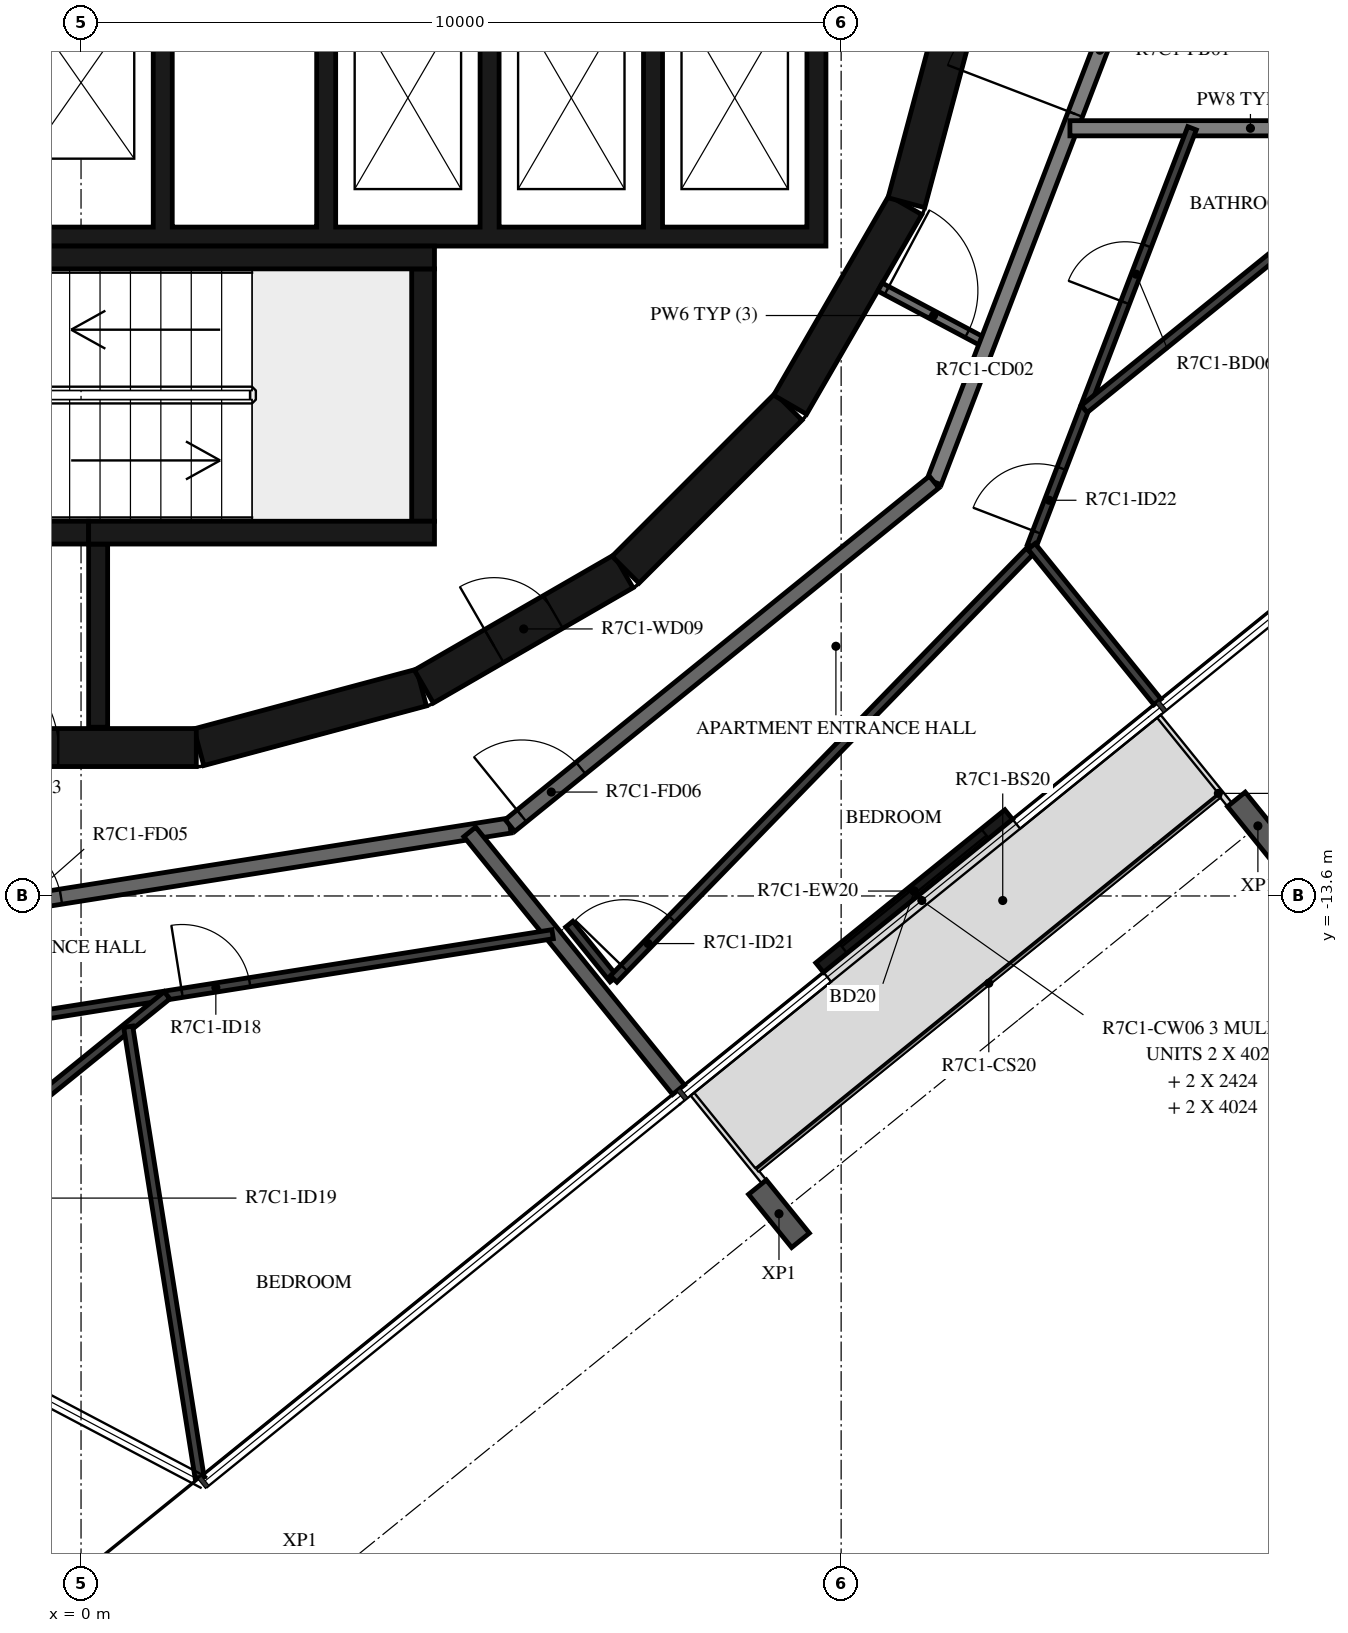
"""IFC4 building model, lengths in metres.
Left out: names, types, materials, properties, quantities, classifications, styles, units other than length and angle.
Written with IfcOpenShell. Run it as: python <this file> out.ifc"""

import sys

from ifc_helpers import new_model, si_unit, direction, frame, frame_2d, origin, origin_2d, place, context, subcontext, project, spatial, polyline, rectangle, i_section, outline, extrude, element, fill, save


model = new_model("IFC4")
c1 = context("Model", 3, precision=1e-05, world=origin(), true_north=direction((0.0, 1.0)))
c2 = subcontext(c1, "Body", "Model", "MODEL_VIEW")
j1 = project(units=[si_unit("LENGTHUNIT", "METRE"), si_unit("PLANEANGLEUNIT", "RADIAN")], contexts=[c1])
p1 = place(None, origin())
s1 = spatial("IfcSite", under=j1, at=p1, CompositionType="ELEMENT")
p2 = place(p1, origin())
s2 = spatial("IfcBuilding", under=s1, at=p2, CompositionType="ELEMENT")
p3 = place(p2, frame((0.0, 0.0, 287.9)))
s3 = spatial("IfcBuildingStorey", under=s2, at=p3, CompositionType="ELEMENT", Elevation=287.9)
for number, where, z_axis, x_axis in (
    (1, (15.483, -12.678, -0.38), (0.0, 0.0, 1.0), (-0.777, -0.629, 0.0)),
    (2, (9.182, -17.781, -0.38), (0.0, 0.0, 1.0), (-0.777, -0.629, 0.0)),
):
    element("IfcColumn", number, at=place(p3, frame(where, z_axis=z_axis, x_axis=x_axis)), inside=s3, PredefinedType="COLUMN", context=c2, shape_type="SweptSolid", body=[
        extrude(i_section(OverallWidth=0.3, OverallDepth=0.9, WebThickness=0.019, FlangeThickness=0.035, FilletRadius=0.03, at=origin_2d()), origin(), (0.0, 0.0, 1.0), 2.616),
    ])
p4 = place(p3, frame((9.717, -14.542, 0.0), z_axis=(0.0, 0.0, 1.0), x_axis=(0.777125818, 0.629345265333, 0.0)))
e3 = element("IfcWall", 3, at=p4, inside=s3, PredefinedType="STANDARD", context=c2, shape_type="SweptSolid", body=[
    extrude(rectangle(XDim=3.2, YDim=0.16, at=frame_2d((1.6, 0.0))), origin(), (0.0, 0.0, 1.0), 3.05),
])
p5 = place(p4, frame((0.4, 0.0, 0.0)))
e4 = element("IfcOpeningElement", 4, at=p5, cuts=e3, PredefinedType="OPENING", context=c2, shape_type="SweptSolid", body=[
    extrude(rectangle(XDim=2.4, YDim=2.4, at=frame_2d((1.2, 1.2))), frame((0.0, 0.09, 0.0), z_axis=(0.0, -1.0, 0.0), x_axis=(1.0, 0.0, 0.0)), (0.0, 0.0, 1.0), 0.18),
])
p6 = place(p3, frame((1.55, -11.643, 0.0), z_axis=(0.0, 0.0, 1.0), x_axis=(0.965948410781, 0.258734743916, 0.0)))
e5 = element("IfcWall", 5, at=p6, inside=s3, PredefinedType="SHEAR", context=c2, shape_type="SweptSolid", body=[
    extrude(rectangle(XDim=3.033, YDim=0.5, at=frame_2d((1.516, 0.0))), origin(), (0.0, 0.0, 1.0), 3.05),
])
p7 = place(p3, frame((4.51, -10.845, 0.0), z_axis=(0.0, 0.0, 1.0), x_axis=(0.865975092491, 0.500087131594, 0.0)))
e6 = element("IfcWall", 6, at=p7, inside=s3, PredefinedType="SHEAR", context=c2, shape_type="SweptSolid", body=[
    extrude(rectangle(XDim=3.033, YDim=0.5, at=frame_2d((1.516, 0.0))), origin(), (0.0, 0.0, 1.0), 3.05),
])
p8 = place(p7, frame((1.066, 0.0, 0.0)))
e7 = element("IfcOpeningElement", 7, at=p8, cuts=e6, PredefinedType="OPENING", context=c2, shape_type="SweptSolid", body=[
    extrude(rectangle(XDim=0.9, YDim=2.1, at=frame_2d((0.45, 1.05))), frame((0.0, 0.26, 0.0), z_axis=(0.0, -1.0, 0.0), x_axis=(1.0, 0.0, 0.0)), (0.0, 0.0, 1.0), 0.52),
])
p9 = place(p3, frame((7.164, -9.308, 0.0), z_axis=(0.0, 0.0, 1.0), x_axis=(0.707106781187, 0.707106781187, 0.0)))
e8 = element("IfcWall", 8, at=p9, inside=s3, PredefinedType="SHEAR", context=c2, shape_type="SweptSolid", body=[
    extrude(rectangle(XDim=3.032, YDim=0.5, at=frame_2d((1.516, 0.0))), origin(), (0.0, 0.0, 1.0), 3.05),
])
for number, where, z_axis, x_axis in (
    (9, (9.329, -7.137, 0.0), (0.0, 0.0, 1.0), (0.5, 0.866, 0.0)),
    (10, (10.858, -4.479, 0.0), (0.0, 0.0, 1.0), (0.259, 0.966, 0.0)),
):
    element("IfcWall", number, at=place(p3, frame(where, z_axis=z_axis, x_axis=x_axis)), inside=s3, PredefinedType="SHEAR", context=c2, shape_type="SweptSolid", body=[
        extrude(rectangle(XDim=3.033, YDim=0.5, at=frame_2d((1.516, 0.0))), origin(), (0.0, 0.0, 1.0), 3.05),
    ])
p10 = place(p3, frame((-1.516, -11.647, 0.0), z_axis=(0.0, 0.0, 1.0), x_axis=(1.0, 0.0, 0.0)))
e11 = element("IfcWall", 11, at=p10, inside=s3, PredefinedType="SHEAR", context=c2, shape_type="SweptSolid", body=[
    extrude(rectangle(XDim=3.033, YDim=0.5, at=frame_2d((1.516, 0.0))), origin(), (0.0, 0.0, 1.0), 3.05),
])
p11 = place(p10, frame((0.016, 0.0, 0.0)))
e12 = element("IfcOpeningElement", 12, at=p11, cuts=e11, PredefinedType="OPENING", context=c2, shape_type="SweptSolid", body=[
    extrude(rectangle(XDim=1.2, YDim=2.1, at=frame_2d((0.6, 1.05))), frame((0.0, 0.26, 0.0), z_axis=(0.0, -1.0, 0.0), x_axis=(1.0, 0.0, 0.0)), (0.0, 0.0, 1.0), 0.52),
])
p12 = place(p3, frame((-2.4, -5.2, 0.0), z_axis=(0.0, 0.0, 1.0), x_axis=(1.0, 0.0, 0.0)))
e13 = element("IfcWall", 13, at=p12, inside=s3, PredefinedType="SHEAR", context=c2, shape_type="SweptSolid", body=[
    extrude(rectangle(XDim=7.05, YDim=0.3, at=frame_2d((3.525, 0.0))), origin(), (0.0, 0.0, 1.0), 3.05),
])
p13 = place(p3, frame((4.5, -8.67, 0.0), z_axis=(0.0, 0.0, 1.0), x_axis=(0.0, 1.0, 0.0)))
e14 = element("IfcWall", 14, at=p13, inside=s3, PredefinedType="SHEAR", context=c2, shape_type="SweptSolid", body=[
    extrude(rectangle(XDim=3.32, YDim=0.3, at=frame_2d((1.66, 0.0))), origin(), (0.0, 0.0, 1.0), 3.05),
])
p14 = place(p3, frame((0.1, -8.82, 0.0), z_axis=(0.0, 0.0, 1.0), x_axis=(1.0, 0.0, 0.0)))
e15 = element("IfcWall", 15, at=p14, inside=s3, PredefinedType="SHEAR", context=c2, shape_type="SweptSolid", body=[
    extrude(rectangle(XDim=4.55, YDim=0.3, at=frame_2d((2.275, 0.0))), origin(), (0.0, 0.0, 1.0), 3.05),
])
p15 = place(p3, frame((-2.4, -8.82, 0.0), z_axis=(0.0, 0.0, 1.0), x_axis=(1.0, 0.0, 0.0)))
e16 = element("IfcWall", 16, at=p15, inside=s3, PredefinedType="SHEAR", context=c2, shape_type="SweptSolid", body=[
    extrude(rectangle(XDim=2.5, YDim=0.3, at=frame_2d((1.25, 0.0))), origin(), (0.0, 0.0, 1.0), 3.05),
])
p16 = place(p15, frame((0.65, 0.0, 0.0)))
e17 = element("IfcOpeningElement", 17, at=p16, cuts=e16, PredefinedType="OPENING", context=c2, shape_type="SweptSolid", body=[
    extrude(rectangle(XDim=1.2, YDim=2.1, at=frame_2d((0.6, 1.05))), frame((0.0, 0.16, 0.0), z_axis=(0.0, -1.0, 0.0), x_axis=(1.0, 0.0, 0.0)), (0.0, 0.0, 1.0), 0.32),
])
p17 = place(p3, frame((0.225, -8.97, 0.0), z_axis=(0.0, 0.0, 1.0), x_axis=(0.0, -1.0, 0.0)))
e18 = element("IfcWall", 18, at=p17, inside=s3, PredefinedType="SHEAR", context=c2, shape_type="SweptSolid", body=[
    extrude(rectangle(XDim=2.41, YDim=0.25, at=frame_2d((1.205, 0.0))), origin(), (0.0, 0.0, 1.0), 3.05),
])
p18 = place(p3, origin())
e19 = element("IfcWall", 19, at=p18, inside=s3, PredefinedType="SHEAR", context=c2, shape_type="SweptSolid", body=[
    extrude(outline(polyline([(9.8, -5.05), (9.8, -4.8), (9.8, -1.9), (9.55, -1.9), (9.55, -4.8), (7.65, -4.8), (7.65, -1.9), (7.4, -1.9), (7.4, -4.8), (5.5, -4.8), (5.5, -1.9), (5.25, -1.9), (5.25, -4.8), (3.35, -4.8), (3.35, -1.9), (3.1, -1.9), (3.1, -4.8), (1.2, -4.8), (1.2, -1.9), (0.95, -1.9), (0.95, -4.8), (-0.95, -4.8), (-0.95, -1.9), (-1.2, -1.9), (-1.2, -4.8), (-3.1, -4.8), (-3.1, -1.9), (-3.35, -1.9), (-3.35, -4.8), (-5.25, -4.8), (-5.25, -1.9), (-5.5, -1.9), (-5.5, -4.8), (-9.55, -4.8), (-9.55, -1.9), (-9.8, -1.9), (-9.8, -4.8), (-9.8, -5.05), (9.8, -5.05)])), origin(), (0.0, 0.0, 1.0), 3.05),
])
p19 = place(p3, frame((10.511, -5.589, 0.0), z_axis=(0.0, 0.0, 1.0), x_axis=(0.882983002821, -0.469404960273, 0.0)))
e20 = element("IfcWall", 20, at=p19, inside=s3, PredefinedType="PARTITIONING", context=c2, shape_type="SweptSolid", body=[
    extrude(rectangle(XDim=1.596, YDim=0.12, at=frame_2d((0.798, 0.0))), origin(), (0.0, 0.0, 1.0), 3.05),
])
p20 = place(p19, frame((0.1, 0.0, 0.0)))
e21 = element("IfcOpeningElement", 21, at=p20, cuts=e20, PredefinedType="OPENING", context=c2, shape_type="SweptSolid", body=[
    extrude(rectangle(XDim=1.2, YDim=2.1, at=frame_2d((0.6, 1.05))), frame((0.0, 0.07, 0.0), z_axis=(0.0, -1.0, 0.0), x_axis=(1.0, 0.0, 0.0)), (0.0, 0.0, 1.0), 0.14),
])
p21 = place(p3, frame((11.223, -8.154, 0.0), z_axis=(0.0, 0.0, 1.0), x_axis=(0.358341090983, 0.93359073609, 0.0)))
e22 = element("IfcWall", 22, at=p21, inside=s3, PredefinedType="STANDARD", context=c2, shape_type="SweptSolid", body=[
    extrude(rectangle(XDim=7.181, YDim=0.2, at=frame_2d((3.59, 0.0))), origin(), (0.0, 0.0, 1.0), 3.05),
])
p22 = place(p21, frame((5.185, 0.0, 0.0)))
e23 = element("IfcOpeningElement", 23, at=p22, cuts=e22, PredefinedType="OPENING", context=c2, shape_type="SweptSolid", body=[
    extrude(rectangle(XDim=1.8, YDim=2.1, at=frame_2d((0.9, 1.05))), frame((0.0, 0.11, 0.0), z_axis=(0.0, -1.0, 0.0), x_axis=(1.0, 0.0, 0.0)), (0.0, 0.0, 1.0), 0.22),
])
p23 = place(p3, frame((-1.45, -13.797, 0.0), z_axis=(0.0, 0.0, 1.0), x_axis=(0.987690361611, 0.156421704315, 0.0)))
e24 = element("IfcWall", 24, at=p23, inside=s3, PredefinedType="STANDARD", context=c2, shape_type="SweptSolid", body=[
    extrude(rectangle(XDim=7.181, YDim=0.2, at=frame_2d((3.591, 0.0))), origin(), (0.0, 0.0, 1.0), 3.05),
])
p24 = place(p23, frame((0.2, 0.0, 0.0)))
e25 = element("IfcOpeningElement", 25, at=p24, cuts=e24, PredefinedType="OPENING", context=c2, shape_type="SweptSolid", body=[
    extrude(rectangle(XDim=1.0, YDim=2.1, at=frame_2d((0.5, 1.05))), frame((0.0, 0.11, 0.0), z_axis=(0.0, -1.0, 0.0), x_axis=(1.0, 0.0, 0.0)), (0.0, 0.0, 1.0), 0.22),
])
p25 = place(p3, frame((5.643, -12.673, 0.0), z_axis=(0.0, 0.0, 1.0), x_axis=(0.777160148113, 0.629302871585, 0.0)))
e26 = element("IfcWall", 26, at=p25, inside=s3, PredefinedType="STANDARD", context=c2, shape_type="SweptSolid", body=[
    extrude(rectangle(XDim=7.181, YDim=0.2, at=frame_2d((3.59, 0.0))), origin(), (0.0, 0.0, 1.0), 3.05),
])
p26 = place(p25, frame((0.2, 0.0, 0.0)))
e27 = element("IfcOpeningElement", 27, at=p26, cuts=e26, PredefinedType="OPENING", context=c2, shape_type="SweptSolid", body=[
    extrude(rectangle(XDim=1.0, YDim=2.1, at=frame_2d((0.5, 1.05))), frame((0.0, 0.11, 0.0), z_axis=(0.0, -1.0, 0.0), x_axis=(1.0, 0.0, 0.0)), (0.0, 0.0, 1.0), 0.22),
])
p27 = place(p3, frame((13.01, -3.5, 0.0), z_axis=(0.0, 0.0, 1.0), x_axis=(1.0, 0.0, 0.0)))
e28 = element("IfcWall", 28, at=p27, inside=s3, PredefinedType="STANDARD", context=c2, shape_type="SweptSolid", body=[
    extrude(rectangle(XDim=4.75, YDim=0.2, at=frame_2d((2.375, 0.0))), origin(), (0.0, 0.0, 1.0), 3.05),
])
p28 = place(p3, frame((7.861, -16.148, 0.0), z_axis=(0.0, 0.0, 1.0), x_axis=(-0.629330189513, 0.777138026716, 0.0)))
e29 = element("IfcWall", 29, at=p28, inside=s3, PredefinedType="STANDARD", context=c2, shape_type="SweptSolid", body=[
    extrude(rectangle(XDim=4.364, YDim=0.2, at=frame_2d((2.182, 0.0))), origin(), (0.0, 0.0, 1.0), 3.05),
])
p29 = place(p3, frame((-1.612, -15.341, 0.0), z_axis=(0.0, 0.0, 1.0), x_axis=(0.987687560018, 0.15643939333, 0.0)))
e30 = element("IfcWall", 30, at=p29, inside=s3, PredefinedType="PARTITIONING", context=c2, shape_type="SweptSolid", body=[
    extrude(rectangle(XDim=7.914, YDim=0.12, at=frame_2d((3.957, 0.0))), origin(), (0.0, 0.0, 1.0), 3.05),
])
p30 = place(p29, frame((2.978, 0.0, 0.0)))
e31 = element("IfcOpeningElement", 31, at=p30, cuts=e30, PredefinedType="OPENING", context=c2, shape_type="SweptSolid", body=[
    extrude(rectangle(XDim=0.9, YDim=2.1, at=frame_2d((0.45, 1.05))), frame((0.0, 0.07, 0.0), z_axis=(0.0, -1.0, 0.0), x_axis=(1.0, 0.0, 0.0)), (0.0, 0.0, 1.0), 0.14),
])
p31 = place(p3, frame((-4.809, -19.717, 0.0), z_axis=(0.0, 0.0, 1.0), x_axis=(0.777140730041, 0.629326851255, 0.0)))
e32 = element("IfcWall", 32, at=p31, inside=s3, PredefinedType="PARTITIONING", context=c2, shape_type="SweptSolid", body=[
    extrude(rectangle(XDim=7.644, YDim=0.12, at=frame_2d((3.822, 0.0))), origin(), (0.0, 0.0, 1.0), 3.05),
])
p32 = place(p31, frame((2.954, 0.0, 0.0)))
e33 = element("IfcOpeningElement", 33, at=p32, cuts=e32, PredefinedType="OPENING", context=c2, shape_type="SweptSolid", body=[
    extrude(rectangle(XDim=0.9, YDim=2.1, at=frame_2d((0.45, 1.05))), frame((0.0, 0.07, 0.0), z_axis=(0.0, -1.0, 0.0), x_axis=(1.0, 0.0, 0.0)), (0.0, 0.0, 1.0), 0.14),
])
p33 = place(p3, frame((1.56, -21.251, 0.0), z_axis=(0.0, 0.0, 1.0), x_axis=(-0.156421913213, 0.987690328528, 0.0)))
e34 = element("IfcWall", 34, at=p33, inside=s3, PredefinedType="PARTITIONING", context=c2, shape_type="SweptSolid", body=[
    extrude(rectangle(XDim=6.004, YDim=0.12, at=frame_2d((3.002, 0.0))), origin(), (0.0, 0.0, 1.0), 3.05),
])
p34 = place(p3, frame((6.424, -13.971, 0.0), z_axis=(0.0, 0.0, 1.0), x_axis=(0.629273936268, -0.777183577499, 0.0)))
e35 = element("IfcWall", 35, at=p34, inside=s3, PredefinedType="PARTITIONING", context=c2, shape_type="SweptSolid", body=[
    extrude(rectangle(XDim=0.928, YDim=0.12, at=frame_2d((0.464, 0.0))), origin(), (0.0, 0.0, 1.0), 3.05),
])
p35 = place(p3, frame((7.007, -14.692, 0.0), z_axis=(0.0, 0.0, 1.0), x_axis=(0.697286714348, 0.716792325568, 0.0)))
e36 = element("IfcWall", 36, at=p35, inside=s3, PredefinedType="PARTITIONING", context=c2, shape_type="SweptSolid", body=[
    extrude(rectangle(XDim=7.848, YDim=0.12, at=frame_2d((3.924, 0.0))), origin(), (0.0, 0.0, 1.0), 3.05),
])
p36 = place(p35, frame((0.2, 0.0, 0.0)))
e37 = element("IfcOpeningElement", 37, at=p36, cuts=e36, PredefinedType="OPENING", context=c2, shape_type="SweptSolid", body=[
    extrude(rectangle(XDim=0.9, YDim=2.1, at=frame_2d((0.45, 1.05))), frame((0.0, 0.07, 0.0), z_axis=(0.0, -1.0, 0.0), x_axis=(1.0, 0.0, 0.0)), (0.0, 0.0, 1.0), 0.14),
])
p37 = place(p3, frame((12.505, -9.001, 0.0), z_axis=(0.0, 0.0, 1.0), x_axis=(0.358373707046, 0.933578216379, 0.0)))
e38 = element("IfcWall", 38, at=p37, inside=s3, PredefinedType="PARTITIONING", context=c2, shape_type="SweptSolid", body=[
    extrude(rectangle(XDim=5.892, YDim=0.12, at=frame_2d((2.946, 0.0))), origin(), (0.0, 0.0, 1.0), 3.05),
])
p38 = place(p37, frame((0.2, 0.0, 0.0)))
e39 = element("IfcOpeningElement", 39, at=p38, cuts=e38, PredefinedType="OPENING", context=c2, shape_type="SweptSolid", body=[
    extrude(rectangle(XDim=0.9, YDim=2.1, at=frame_2d((0.45, 1.05))), frame((0.0, 0.07, 0.0), z_axis=(0.0, -1.0, 0.0), x_axis=(1.0, 0.0, 0.0)), (0.0, 0.0, 1.0), 0.14),
])
p39 = place(p37, frame((3.436, 0.0, 0.0)))
e40 = element("IfcOpeningElement", 40, at=p39, cuts=e38, PredefinedType="OPENING", context=c2, shape_type="SweptSolid", body=[
    extrude(rectangle(XDim=0.8, YDim=2.1, at=frame_2d((0.4, 1.05))), frame((0.0, 0.07, 0.0), z_axis=(0.0, -1.0, 0.0), x_axis=(1.0, 0.0, 0.0)), (0.0, 0.0, 1.0), 0.14),
])
p40 = place(p3, frame((14.161, -11.046, 0.0), z_axis=(0.0, 0.0, 1.0), x_axis=(-0.62931028473, 0.777154145284, 0.0)))
e41 = element("IfcWall", 41, at=p40, inside=s3, PredefinedType="PARTITIONING", context=c2, shape_type="SweptSolid", body=[
    extrude(rectangle(XDim=2.632, YDim=0.12, at=frame_2d((1.316, 0.0))), origin(), (0.0, 0.0, 1.0), 3.05),
])
p41 = place(p3, frame((17.76, -3.5, 0.0), z_axis=(0.0, 0.0, 1.0), x_axis=(-0.777133455716, -0.62933583404, 0.0)))
e42 = element("IfcWall", 42, at=p41, inside=s3, PredefinedType="PARTITIONING", context=c2, shape_type="SweptSolid", body=[
    extrude(rectangle(XDim=5.869, YDim=0.12, at=frame_2d((2.935, 0.0))), origin(), (0.0, 0.0, 1.0), 3.05),
])
p42 = place(p5, origin())
e43 = element("IfcDoor", 43, at=p42, inside=s3, OperationType="DOUBLE_DOOR_SLIDING", PredefinedType="DOOR", context=c2, shape_type="SweptSolid", body=[
    extrude(rectangle(XDim=2.4, YDim=2.4, at=frame_2d((1.2, 1.2))), frame((0.0, 0.025, 0.0), z_axis=(0.0, -1.0, 0.0), x_axis=(1.0, 0.0, 0.0)), (0.0, 0.0, 1.0), 0.05),
])
fill(e4, e43)
p43 = place(p11, origin())
e44 = element("IfcDoor", 44, at=p43, inside=s3, OperationType="SINGLE_SWING_RIGHT", PredefinedType="DOOR", context=c2, shape_type="SweptSolid", body=[
    extrude(rectangle(XDim=1.2, YDim=2.1, at=frame_2d((0.6, 1.05))), frame((0.0, 0.025, 0.0), z_axis=(0.0, -1.0, 0.0), x_axis=(1.0, 0.0, 0.0)), (0.0, 0.0, 1.0), 0.05),
])
fill(e12, e44)
p44 = place(p8, origin())
e45 = element("IfcDoor", 45, at=p44, inside=s3, OperationType="SINGLE_SWING_LEFT", PredefinedType="DOOR", context=c2, shape_type="SweptSolid", body=[
    extrude(rectangle(XDim=0.9, YDim=2.1, at=frame_2d((0.45, 1.05))), frame((0.0, 0.025, 0.0), z_axis=(0.0, -1.0, 0.0), x_axis=(1.0, 0.0, 0.0)), (0.0, 0.0, 1.0), 0.05),
])
fill(e7, e45)
p45 = place(p24, origin())
e46 = element("IfcDoor", 46, at=p45, inside=s3, OperationType="SINGLE_SWING_LEFT", PredefinedType="DOOR", context=c2, shape_type="SweptSolid", body=[
    extrude(rectangle(XDim=1.0, YDim=2.1, at=frame_2d((0.5, 1.05))), frame((0.0, 0.025, 0.0), z_axis=(0.0, -1.0, 0.0), x_axis=(1.0, 0.0, 0.0)), (0.0, 0.0, 1.0), 0.05),
])
fill(e25, e46)
p46 = place(p30, origin())
e47 = element("IfcDoor", 47, at=p46, inside=s3, OperationType="SINGLE_SWING_LEFT", PredefinedType="DOOR", context=c2, shape_type="SweptSolid", body=[
    extrude(rectangle(XDim=0.9, YDim=2.1, at=frame_2d((0.45, 1.05))), frame((0.0, 0.025, 0.0), z_axis=(0.0, -1.0, 0.0), x_axis=(1.0, 0.0, 0.0)), (0.0, 0.0, 1.0), 0.05),
])
fill(e31, e47)
p47 = place(p26, origin())
e48 = element("IfcDoor", 48, at=p47, inside=s3, OperationType="SINGLE_SWING_LEFT", PredefinedType="DOOR", context=c2, shape_type="SweptSolid", body=[
    extrude(rectangle(XDim=1.0, YDim=2.1, at=frame_2d((0.5, 1.05))), frame((0.0, 0.025, 0.0), z_axis=(0.0, -1.0, 0.0), x_axis=(1.0, 0.0, 0.0)), (0.0, 0.0, 1.0), 0.05),
])
fill(e27, e48)
p48 = place(p36, origin())
e49 = element("IfcDoor", 49, at=p48, inside=s3, OperationType="SINGLE_SWING_LEFT", PredefinedType="DOOR", context=c2, shape_type="SweptSolid", body=[
    extrude(rectangle(XDim=0.9, YDim=2.1, at=frame_2d((0.45, 1.05))), frame((0.0, 0.025, 0.0), z_axis=(0.0, -1.0, 0.0), x_axis=(1.0, 0.0, 0.0)), (0.0, 0.0, 1.0), 0.05),
])
fill(e37, e49)
p49 = place(p38, origin())
e50 = element("IfcDoor", 50, at=p49, inside=s3, OperationType="SINGLE_SWING_RIGHT", PredefinedType="DOOR", context=c2, shape_type="SweptSolid", body=[
    extrude(rectangle(XDim=0.9, YDim=2.1, at=frame_2d((0.45, 1.05))), frame((0.0, 0.025, 0.0), z_axis=(0.0, -1.0, 0.0), x_axis=(1.0, 0.0, 0.0)), (0.0, 0.0, 1.0), 0.05),
])
fill(e39, e50)
p50 = place(p39, origin())
e51 = element("IfcDoor", 51, at=p50, inside=s3, OperationType="SINGLE_SWING_RIGHT", PredefinedType="DOOR", context=c2, shape_type="SweptSolid", body=[
    extrude(rectangle(XDim=0.8, YDim=2.1, at=frame_2d((0.4, 1.05))), frame((0.0, 0.025, 0.0), z_axis=(0.0, -1.0, 0.0), x_axis=(1.0, 0.0, 0.0)), (0.0, 0.0, 1.0), 0.05),
])
fill(e40, e51)
p51 = place(p20, origin())
e52 = element("IfcDoor", 52, at=p51, inside=s3, OperationType="DOUBLE_DOOR_SINGLE_SWING", PredefinedType="DOOR", context=c2, shape_type="SweptSolid", body=[
    extrude(rectangle(XDim=1.2, YDim=2.1, at=frame_2d((0.6, 1.05))), frame((0.0, 0.025, 0.0), z_axis=(0.0, -1.0, 0.0), x_axis=(1.0, 0.0, 0.0)), (0.0, 0.0, 1.0), 0.05),
])
fill(e21, e52)
p52 = place(p22, origin())
e53 = element("IfcDoor", 53, at=p52, inside=s3, OperationType="DOUBLE_DOOR_SINGLE_SWING", PredefinedType="DOOR", context=c2, shape_type="SweptSolid", body=[
    extrude(rectangle(XDim=1.8, YDim=2.1, at=frame_2d((0.9, 1.05))), frame((0.0, 0.025, 0.0), z_axis=(0.0, -1.0, 0.0), x_axis=(1.0, 0.0, 0.0)), (0.0, 0.0, 1.0), 0.05),
])
fill(e23, e53)
save(model, sys.argv[1])
